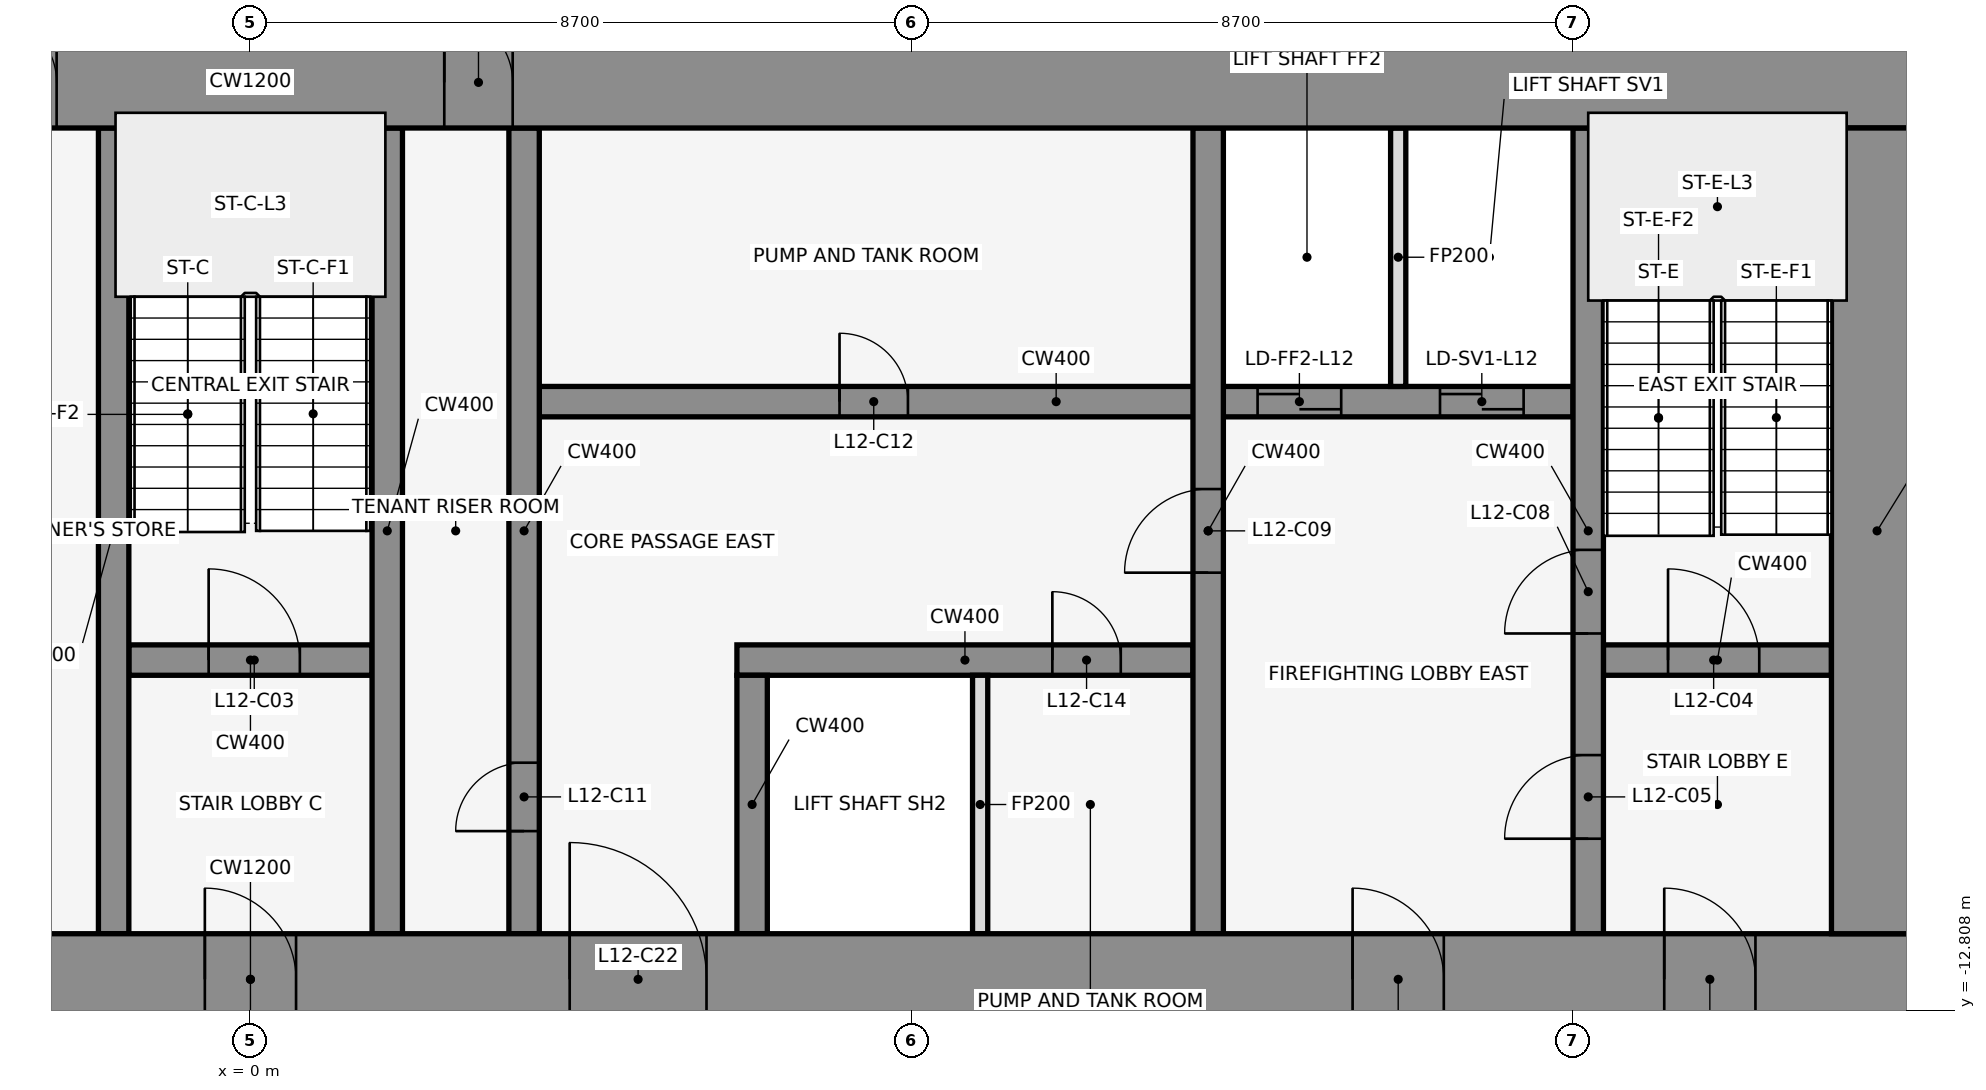
"""IFC4 building model, lengths in metres.
Left out: names, types, materials, properties, quantities, classifications, styles, units other than length and angle.
Written with IfcOpenShell. Run it as: python <this file> out.ifc"""

import sys

from ifc_helpers import new_model, si_unit, direction, frame, frame_2d, origin, place, context, subcontext, project, spatial, rectangle, extrude, element, fill, save


model = new_model("IFC4")
c1 = context("Model", 3, precision=1e-05, world=origin(), true_north=direction((0.0, 1.0)))
c2 = subcontext(c1, "Body", "Model", "MODEL_VIEW")
j1 = project(units=[si_unit("LENGTHUNIT", "METRE"), si_unit("PLANEANGLEUNIT", "RADIAN")], contexts=[c1])
p1 = place(None, origin())
s1 = spatial("IfcSite", under=j1, at=p1, CompositionType="ELEMENT")
p2 = place(p1, origin())
s2 = spatial("IfcBuilding", under=s1, at=p2, CompositionType="ELEMENT")
p3 = place(p2, frame((0.0, 0.0, 62.0)))
s3 = spatial("IfcBuildingStorey", under=s2, at=p3, CompositionType="ELEMENT", Elevation=62.0)
for number, where, z_axis, x_axis in (
    (1, (16.432, -0.105, 0.0), (0.0, 0.0, 1.0), (-0.84, 0.543, 0.0)),
    (2, (1.901, 1.08, 0.0), (0.0, 0.0, 1.0), (-0.84, -0.543, 0.0)),
    (3, (-0.068, -0.105, 0.0), (0.0, 0.0, 1.0), (-0.84, 0.543, 0.0)),
):
    element("IfcWall", number, at=place(p3, frame(where, z_axis=z_axis, x_axis=x_axis)), inside=s3, PredefinedType="STANDARD", context=c2, shape_type="SweptSolid", body=[
        extrude(rectangle(XDim=2.183, YDim=0.25, at=frame_2d((1.091, 0.0))), origin(), (0.0, 0.0, 1.0), 4.35),
    ])
p4 = place(p3, frame((-1.6, -8.2, 0.0), z_axis=(0.0, 0.0, 1.0), x_axis=(1.0, 0.0, 0.0)))
e4 = element("IfcWall", 4, at=p4, inside=s3, PredefinedType="SHEAR", context=c2, shape_type="SweptSolid", body=[
    extrude(rectangle(XDim=3.2, YDim=0.4, at=frame_2d((1.6, 0.0))), origin(), (0.0, 0.0, 1.0), 4.5),
])
p5 = place(p4, frame((1.05, 0.0, 0.0)))
e5 = element("IfcOpeningElement", 5, at=p5, cuts=e4, PredefinedType="OPENING", context=c2, shape_type="SweptSolid", body=[
    extrude(rectangle(XDim=1.2, YDim=2.1, at=frame_2d((0.6, 1.05))), frame((0.0, 0.212, 0.0), z_axis=(0.0, -1.0, 0.0), x_axis=(1.0, 0.0, 0.0)), (0.0, 0.0, 1.0), 0.424),
])
p6 = place(p3, frame((6.4, -8.2, 0.0), z_axis=(0.0, 0.0, 1.0), x_axis=(1.0, 0.0, 0.0)))
e6 = element("IfcWall", 6, at=p6, inside=s3, PredefinedType="SHEAR", context=c2, shape_type="SweptSolid", body=[
    extrude(rectangle(XDim=6.0, YDim=0.4, at=frame_2d((3.0, 0.0))), origin(), (0.0, 0.0, 1.0), 4.5),
])
p7 = place(p6, frame((4.15, 0.0, 0.0)))
e7 = element("IfcOpeningElement", 7, at=p7, cuts=e6, PredefinedType="OPENING", context=c2, shape_type="SweptSolid", body=[
    extrude(rectangle(XDim=0.9, YDim=2.1, at=frame_2d((0.45, 1.05))), frame((0.0, 0.212, 0.0), z_axis=(0.0, -1.0, 0.0), x_axis=(1.0, 0.0, 0.0)), (0.0, 0.0, 1.0), 0.424),
])
p8 = place(p3, frame((17.8, -8.2, 0.0), z_axis=(0.0, 0.0, 1.0), x_axis=(1.0, 0.0, 0.0)))
e8 = element("IfcWall", 8, at=p8, inside=s3, PredefinedType="SHEAR", context=c2, shape_type="SweptSolid", body=[
    extrude(rectangle(XDim=3.0, YDim=0.4, at=frame_2d((1.5, 0.0))), origin(), (0.0, 0.0, 1.0), 4.5),
])
p9 = place(p8, frame((0.85, 0.0, 0.0)))
e9 = element("IfcOpeningElement", 9, at=p9, cuts=e8, PredefinedType="OPENING", context=c2, shape_type="SweptSolid", body=[
    extrude(rectangle(XDim=1.2, YDim=2.1, at=frame_2d((0.6, 1.05))), frame((0.0, 0.212, 0.0), z_axis=(0.0, -1.0, 0.0), x_axis=(1.0, 0.0, 0.0)), (0.0, 0.0, 1.0), 0.424),
])
p10 = place(p3, frame((3.8, -4.8, 0.0), z_axis=(0.0, 0.0, 1.0), x_axis=(1.0, 0.0, 0.0)))
e10 = element("IfcWall", 10, at=p10, inside=s3, PredefinedType="SHEAR", context=c2, shape_type="SweptSolid", body=[
    extrude(rectangle(XDim=13.6, YDim=0.4, at=frame_2d((6.8, 0.0))), origin(), (0.0, 0.0, 1.0), 4.5),
])
p11 = place(p10, frame((9.45, 0.0, 0.0)))
e11 = element("IfcOpeningElement", 11, at=p11, cuts=e10, PredefinedType="OPENING", context=c2, shape_type="SweptSolid", body=[
    extrude(rectangle(XDim=1.1, YDim=2.1, at=frame_2d((0.55, 1.05))), frame((0.0, 0.212, 0.0), z_axis=(0.0, -1.0, 0.0), x_axis=(1.0, 0.0, 0.0)), (0.0, 0.0, 1.0), 0.424),
])
p12 = place(p10, frame((11.85, 0.0, 0.0)))
e12 = element("IfcOpeningElement", 12, at=p12, cuts=e10, PredefinedType="OPENING", context=c2, shape_type="SweptSolid", body=[
    extrude(rectangle(XDim=1.1, YDim=2.1, at=frame_2d((0.55, 1.05))), frame((0.0, 0.212, 0.0), z_axis=(0.0, -1.0, 0.0), x_axis=(1.0, 0.0, 0.0)), (0.0, 0.0, 1.0), 0.424),
])
p13 = place(p10, frame((3.95, 0.0, 0.0)))
e13 = element("IfcOpeningElement", 13, at=p13, cuts=e10, PredefinedType="OPENING", context=c2, shape_type="SweptSolid", body=[
    extrude(rectangle(XDim=0.9, YDim=2.1, at=frame_2d((0.45, 1.05))), frame((0.0, 0.212, 0.0), z_axis=(0.0, -1.0, 0.0), x_axis=(1.0, 0.0, 0.0)), (0.0, 0.0, 1.0), 0.424),
])
for number, where, z_axis, x_axis in (
    (14, (-1.8, -11.8, 0.0), (0.0, 0.0, 1.0), (0.0, 1.0, 0.0)),
    (15, (1.8, -11.8, 0.0), (0.0, 0.0, 1.0), (0.0, 1.0, 0.0)),
):
    element("IfcWall", number, at=place(p3, frame(where, z_axis=z_axis, x_axis=x_axis)), inside=s3, PredefinedType="SHEAR", context=c2, shape_type="SweptSolid", body=[
        extrude(rectangle(XDim=10.6, YDim=0.4, at=frame_2d((5.3, 0.0))), origin(), (0.0, 0.0, 1.0), 4.5),
    ])
p14 = place(p3, frame((3.6, -11.8, 0.0), z_axis=(0.0, 0.0, 1.0), x_axis=(0.0, 1.0, 0.0)))
e16 = element("IfcWall", 16, at=p14, inside=s3, PredefinedType="SHEAR", context=c2, shape_type="SweptSolid", body=[
    extrude(rectangle(XDim=10.6, YDim=0.4, at=frame_2d((5.3, 0.0))), origin(), (0.0, 0.0, 1.0), 4.5),
])
p15 = place(p14, frame((1.35, 0.0, 0.0)))
e17 = element("IfcOpeningElement", 17, at=p15, cuts=e16, PredefinedType="OPENING", context=c2, shape_type="SweptSolid", body=[
    extrude(rectangle(XDim=0.9, YDim=2.1, at=frame_2d((0.45, 1.05))), frame((0.0, 0.212, 0.0), z_axis=(0.0, -1.0, 0.0), x_axis=(1.0, 0.0, 0.0)), (0.0, 0.0, 1.0), 0.424),
])
p16 = place(p3, frame((6.6, -11.8, 0.0), z_axis=(0.0, 0.0, 1.0), x_axis=(0.0, 1.0, 0.0)))
e18 = element("IfcWall", 18, at=p16, inside=s3, PredefinedType="SHEAR", context=c2, shape_type="SweptSolid", body=[
    extrude(rectangle(XDim=3.4, YDim=0.4, at=frame_2d((1.7, 0.0))), origin(), (0.0, 0.0, 1.0), 4.5),
])
p17 = place(p3, frame((9.6, -11.8, 0.0), z_axis=(0.0, 0.0, 1.0), x_axis=(0.0, 1.0, 0.0)))
e19 = element("IfcWall", 19, at=p17, inside=s3, PredefinedType="PARTITIONING", context=c2, shape_type="SweptSolid", body=[
    extrude(rectangle(XDim=3.4, YDim=0.2, at=frame_2d((1.7, 0.0))), origin(), (0.0, 0.0, 1.0), 3.418),
])
p18 = place(p3, frame((12.6, -11.8, 0.0), z_axis=(0.0, 0.0, 1.0), x_axis=(0.0, 1.0, 0.0)))
e20 = element("IfcWall", 20, at=p18, inside=s3, PredefinedType="SHEAR", context=c2, shape_type="SweptSolid", body=[
    extrude(rectangle(XDim=10.6, YDim=0.4, at=frame_2d((5.3, 0.0))), origin(), (0.0, 0.0, 1.0), 4.5),
])
p19 = place(p18, frame((4.75, 0.0, 0.0)))
e21 = element("IfcOpeningElement", 21, at=p19, cuts=e20, PredefinedType="OPENING", context=c2, shape_type="SweptSolid", body=[
    extrude(rectangle(XDim=1.1, YDim=2.1, at=frame_2d((0.55, 1.05))), frame((0.0, 0.212, 0.0), z_axis=(0.0, -1.0, 0.0), x_axis=(1.0, 0.0, 0.0)), (0.0, 0.0, 1.0), 0.424),
])
p20 = place(p3, frame((15.1, -4.6, 0.0), z_axis=(0.0, 0.0, 1.0), x_axis=(0.0, 1.0, 0.0)))
e22 = element("IfcWall", 22, at=p20, inside=s3, PredefinedType="PARTITIONING", context=c2, shape_type="SweptSolid", body=[
    extrude(rectangle(XDim=3.4, YDim=0.2, at=frame_2d((1.7, 0.0))), origin(), (0.0, 0.0, 1.0), 3.418),
])
p21 = place(p3, frame((17.6, -11.8, 0.0), z_axis=(0.0, 0.0, 1.0), x_axis=(0.0, 1.0, 0.0)))
e23 = element("IfcWall", 23, at=p21, inside=s3, PredefinedType="SHEAR", context=c2, shape_type="SweptSolid", body=[
    extrude(rectangle(XDim=10.6, YDim=0.4, at=frame_2d((5.3, 0.0))), origin(), (0.0, 0.0, 1.0), 4.5),
])
p22 = place(p21, frame((1.25, 0.0, 0.0)))
e24 = element("IfcOpeningElement", 24, at=p22, cuts=e23, PredefinedType="OPENING", context=c2, shape_type="SweptSolid", body=[
    extrude(rectangle(XDim=1.1, YDim=2.1, at=frame_2d((0.55, 1.05))), frame((0.0, 0.212, 0.0), z_axis=(0.0, -1.0, 0.0), x_axis=(1.0, 0.0, 0.0)), (0.0, 0.0, 1.0), 0.424),
])
p23 = place(p21, frame((3.95, 0.0, 0.0)))
e25 = element("IfcOpeningElement", 25, at=p23, cuts=e23, PredefinedType="OPENING", context=c2, shape_type="SweptSolid", body=[
    extrude(rectangle(XDim=1.1, YDim=2.1, at=frame_2d((0.55, 1.05))), frame((0.0, 0.212, 0.0), z_axis=(0.0, -1.0, 0.0), x_axis=(1.0, 0.0, 0.0)), (0.0, 0.0, 1.0), 0.424),
])
p24 = place(p3, frame((-22.0, -0.6, 0.0), z_axis=(0.0, 0.0, 1.0), x_axis=(1.0, 0.0, 0.0)))
e26 = element("IfcWall", 26, at=p24, inside=s3, PredefinedType="SHEAR", context=c2, shape_type="SweptSolid", body=[
    extrude(rectangle(XDim=44.0, YDim=1.2, at=frame_2d((22.0, 0.0))), origin(), (0.0, 0.0, 1.0), 4.5),
])
p25 = place(p24, frame((18.55, 0.0, 0.0)))
e27 = element("IfcOpeningElement", 27, at=p25, cuts=e26, PredefinedType="OPENING", context=c2, shape_type="SweptSolid", body=[
    extrude(rectangle(XDim=0.9, YDim=2.1, at=frame_2d((0.45, 1.05))), frame((0.0, 0.612, 0.0), z_axis=(0.0, -1.0, 0.0), x_axis=(1.0, 0.0, 0.0)), (0.0, 0.0, 1.0), 1.224),
])
p26 = place(p24, frame((24.55, 0.0, 0.0)))
e28 = element("IfcOpeningElement", 28, at=p26, cuts=e26, PredefinedType="OPENING", context=c2, shape_type="SweptSolid", body=[
    extrude(rectangle(XDim=0.9, YDim=2.1, at=frame_2d((0.45, 1.05))), frame((0.0, 0.612, 0.0), z_axis=(0.0, -1.0, 0.0), x_axis=(1.0, 0.0, 0.0)), (0.0, 0.0, 1.0), 1.224),
])
p27 = place(p3, frame((-22.0, -12.4, 0.0), z_axis=(0.0, 0.0, 1.0), x_axis=(1.0, 0.0, 0.0)))
e29 = element("IfcWall", 29, at=p27, inside=s3, PredefinedType="SHEAR", context=c2, shape_type="SweptSolid", body=[
    extrude(rectangle(XDim=44.0, YDim=1.2, at=frame_2d((22.0, 0.0))), origin(), (0.0, 0.0, 1.0), 4.5),
])
p28 = place(p27, frame((2.2, 0.0, 0.0)))
e30 = element("IfcOpeningElement", 30, at=p28, cuts=e29, PredefinedType="OPENING", context=c2, shape_type="SweptSolid", body=[
    extrude(rectangle(XDim=1.2, YDim=2.1, at=frame_2d((0.6, 1.05))), frame((0.0, 0.612, 0.0), z_axis=(0.0, -1.0, 0.0), x_axis=(1.0, 0.0, 0.0)), (0.0, 0.0, 1.0), 1.224),
])
p29 = place(p27, frame((21.4, 0.0, 0.0)))
e31 = element("IfcOpeningElement", 31, at=p29, cuts=e29, PredefinedType="OPENING", context=c2, shape_type="SweptSolid", body=[
    extrude(rectangle(XDim=1.2, YDim=2.1, at=frame_2d((0.6, 1.05))), frame((0.0, 0.612, 0.0), z_axis=(0.0, -1.0, 0.0), x_axis=(1.0, 0.0, 0.0)), (0.0, 0.0, 1.0), 1.224),
])
p30 = place(p27, frame((40.6, 0.0, 0.0)))
e32 = element("IfcOpeningElement", 32, at=p30, cuts=e29, PredefinedType="OPENING", context=c2, shape_type="SweptSolid", body=[
    extrude(rectangle(XDim=1.2, YDim=2.1, at=frame_2d((0.6, 1.05))), frame((0.0, 0.612, 0.0), z_axis=(0.0, -1.0, 0.0), x_axis=(1.0, 0.0, 0.0)), (0.0, 0.0, 1.0), 1.224),
])
p31 = place(p27, frame((16.0, 0.0, 0.0)))
e33 = element("IfcOpeningElement", 33, at=p31, cuts=e29, PredefinedType="OPENING", context=c2, shape_type="SweptSolid", body=[
    extrude(rectangle(XDim=1.8, YDim=2.1, at=frame_2d((0.9, 1.05))), frame((0.0, 0.612, 0.0), z_axis=(0.0, -1.0, 0.0), x_axis=(1.0, 0.0, 0.0)), (0.0, 0.0, 1.0), 1.224),
])
p32 = place(p27, frame((6.3, 0.0, 0.0)))
e34 = element("IfcOpeningElement", 34, at=p32, cuts=e29, PredefinedType="OPENING", context=c2, shape_type="SweptSolid", body=[
    extrude(rectangle(XDim=1.2, YDim=2.1, at=frame_2d((0.6, 1.05))), frame((0.0, 0.612, 0.0), z_axis=(0.0, -1.0, 0.0), x_axis=(1.0, 0.0, 0.0)), (0.0, 0.0, 1.0), 1.224),
])
p33 = place(p27, frame((26.2, 0.0, 0.0)))
e35 = element("IfcOpeningElement", 35, at=p33, cuts=e29, PredefinedType="OPENING", context=c2, shape_type="SweptSolid", body=[
    extrude(rectangle(XDim=1.8, YDim=2.1, at=frame_2d((0.9, 1.05))), frame((0.0, 0.612, 0.0), z_axis=(0.0, -1.0, 0.0), x_axis=(1.0, 0.0, 0.0)), (0.0, 0.0, 1.0), 1.224),
])
p34 = place(p27, frame((36.5, 0.0, 0.0)))
e36 = element("IfcOpeningElement", 36, at=p34, cuts=e29, PredefinedType="OPENING", context=c2, shape_type="SweptSolid", body=[
    extrude(rectangle(XDim=1.2, YDim=2.1, at=frame_2d((0.6, 1.05))), frame((0.0, 0.612, 0.0), z_axis=(0.0, -1.0, 0.0), x_axis=(1.0, 0.0, 0.0)), (0.0, 0.0, 1.0), 1.224),
])
p35 = place(p3, frame((21.4, -11.8, 0.0), z_axis=(0.0, 0.0, 1.0), x_axis=(0.0, 1.0, 0.0)))
e37 = element("IfcWall", 37, at=p35, inside=s3, PredefinedType="SHEAR", context=c2, shape_type="SweptSolid", body=[
    extrude(rectangle(XDim=10.6, YDim=1.2, at=frame_2d((5.3, 0.0))), origin(), (0.0, 0.0, 1.0), 4.5),
])
p36 = place(p5, origin())
e38 = element("IfcDoor", 38, at=p36, inside=s3, OperationType="SINGLE_SWING_LEFT", PredefinedType="DOOR", context=c2, shape_type="SweptSolid", body=[
    extrude(rectangle(XDim=1.2, YDim=2.1, at=frame_2d((0.6, 1.05))), frame((0.0, 0.025, 0.0), z_axis=(0.0, -1.0, 0.0), x_axis=(1.0, 0.0, 0.0)), (0.0, 0.0, 1.0), 0.05),
])
fill(e5, e38)
p37 = place(p9, origin())
e39 = element("IfcDoor", 39, at=p37, inside=s3, OperationType="SINGLE_SWING_RIGHT", PredefinedType="DOOR", context=c2, shape_type="SweptSolid", body=[
    extrude(rectangle(XDim=1.2, YDim=2.1, at=frame_2d((0.6, 1.05))), frame((0.0, 0.025, 0.0), z_axis=(0.0, -1.0, 0.0), x_axis=(1.0, 0.0, 0.0)), (0.0, 0.0, 1.0), 0.05),
])
fill(e9, e39)
p38 = place(p22, origin())
e40 = element("IfcDoor", 40, at=p38, inside=s3, OperationType="SINGLE_SWING_LEFT", PredefinedType="DOOR", context=c2, shape_type="SweptSolid", body=[
    extrude(rectangle(XDim=1.1, YDim=2.1, at=frame_2d((0.55, 1.05))), frame((0.0, 0.025, 0.0), z_axis=(0.0, -1.0, 0.0), x_axis=(1.0, 0.0, 0.0)), (0.0, 0.0, 1.0), 0.05),
])
fill(e24, e40)
p39 = place(p11, origin())
e41 = element("IfcDoor", 41, at=p39, inside=s3, OperationType="DOUBLE_DOOR_SLIDING", PredefinedType="DOOR", context=c2, shape_type="SweptSolid", body=[
    extrude(rectangle(XDim=1.1, YDim=2.1, at=frame_2d((0.55, 1.05))), frame((0.0, 0.025, 0.0), z_axis=(0.0, -1.0, 0.0), x_axis=(1.0, 0.0, 0.0)), (0.0, 0.0, 1.0), 0.05),
])
fill(e11, e41)
p40 = place(p12, origin())
e42 = element("IfcDoor", 42, at=p40, inside=s3, OperationType="DOUBLE_DOOR_SLIDING", PredefinedType="DOOR", context=c2, shape_type="SweptSolid", body=[
    extrude(rectangle(XDim=1.1, YDim=2.1, at=frame_2d((0.55, 1.05))), frame((0.0, 0.025, 0.0), z_axis=(0.0, -1.0, 0.0), x_axis=(1.0, 0.0, 0.0)), (0.0, 0.0, 1.0), 0.05),
])
fill(e12, e42)
p41 = place(p23, origin())
e43 = element("IfcDoor", 43, at=p41, inside=s3, OperationType="SINGLE_SWING_RIGHT", PredefinedType="DOOR", context=c2, shape_type="SweptSolid", body=[
    extrude(rectangle(XDim=1.1, YDim=2.1, at=frame_2d((0.55, 1.05))), frame((0.0, 0.025, 0.0), z_axis=(0.0, -1.0, 0.0), x_axis=(1.0, 0.0, 0.0)), (0.0, 0.0, 1.0), 0.05),
])
fill(e25, e43)
p42 = place(p19, frame((1.1, 0.0, 0.0), z_axis=(0.0, 0.0, 1.0), x_axis=(-1.0, 0.0, 0.0)))
e44 = element("IfcDoor", 44, at=p42, inside=s3, OperationType="SINGLE_SWING_RIGHT", PredefinedType="DOOR", context=c2, shape_type="SweptSolid", body=[
    extrude(rectangle(XDim=1.1, YDim=2.1, at=frame_2d((0.55, 1.05))), frame((0.0, 0.025, 0.0), z_axis=(0.0, -1.0, 0.0), x_axis=(1.0, 0.0, 0.0)), (0.0, 0.0, 1.0), 0.05),
])
fill(e21, e44)
p43 = place(p15, origin())
e45 = element("IfcDoor", 45, at=p43, inside=s3, OperationType="SINGLE_SWING_LEFT", PredefinedType="DOOR", context=c2, shape_type="SweptSolid", body=[
    extrude(rectangle(XDim=0.9, YDim=2.1, at=frame_2d((0.45, 1.05))), frame((0.0, 0.025, 0.0), z_axis=(0.0, -1.0, 0.0), x_axis=(1.0, 0.0, 0.0)), (0.0, 0.0, 1.0), 0.05),
])
fill(e17, e45)
p44 = place(p13, origin())
e46 = element("IfcDoor", 46, at=p44, inside=s3, OperationType="SINGLE_SWING_RIGHT", PredefinedType="DOOR", context=c2, shape_type="SweptSolid", body=[
    extrude(rectangle(XDim=0.9, YDim=2.1, at=frame_2d((0.45, 1.05))), frame((0.0, 0.025, 0.0), z_axis=(0.0, -1.0, 0.0), x_axis=(1.0, 0.0, 0.0)), (0.0, 0.0, 1.0), 0.05),
])
fill(e13, e46)
p45 = place(p7, frame((0.9, 0.0, 0.0), z_axis=(0.0, 0.0, 1.0), x_axis=(-1.0, 0.0, 0.0)))
e47 = element("IfcDoor", 47, at=p45, inside=s3, OperationType="SINGLE_SWING_LEFT", PredefinedType="DOOR", context=c2, shape_type="SweptSolid", body=[
    extrude(rectangle(XDim=0.9, YDim=2.1, at=frame_2d((0.45, 1.05))), frame((0.0, 0.025, 0.0), z_axis=(0.0, -1.0, 0.0), x_axis=(1.0, 0.0, 0.0)), (0.0, 0.0, 1.0), 0.05),
])
fill(e7, e47)
p46 = place(p25, origin())
e48 = element("IfcDoor", 48, at=p46, inside=s3, OperationType="SINGLE_SWING_LEFT", PredefinedType="DOOR", context=c2, shape_type="SweptSolid", body=[
    extrude(rectangle(XDim=0.9, YDim=2.1, at=frame_2d((0.45, 1.05))), frame((0.0, 0.025, 0.0), z_axis=(0.0, -1.0, 0.0), x_axis=(1.0, 0.0, 0.0)), (0.0, 0.0, 1.0), 0.05),
])
fill(e27, e48)
p47 = place(p26, origin())
e49 = element("IfcDoor", 49, at=p47, inside=s3, OperationType="SINGLE_SWING_LEFT", PredefinedType="DOOR", context=c2, shape_type="SweptSolid", body=[
    extrude(rectangle(XDim=0.9, YDim=2.1, at=frame_2d((0.45, 1.05))), frame((0.0, 0.025, 0.0), z_axis=(0.0, -1.0, 0.0), x_axis=(1.0, 0.0, 0.0)), (0.0, 0.0, 1.0), 0.05),
])
fill(e28, e49)
p48 = place(p29, frame((1.2, 0.0, 0.0), z_axis=(0.0, 0.0, 1.0), x_axis=(-1.0, 0.0, 0.0)))
e50 = element("IfcDoor", 50, at=p48, inside=s3, OperationType="SINGLE_SWING_RIGHT", PredefinedType="DOOR", context=c2, shape_type="SweptSolid", body=[
    extrude(rectangle(XDim=1.2, YDim=2.1, at=frame_2d((0.6, 1.05))), frame((0.0, 0.025, 0.0), z_axis=(0.0, -1.0, 0.0), x_axis=(1.0, 0.0, 0.0)), (0.0, 0.0, 1.0), 0.05),
])
fill(e31, e50)
p49 = place(p30, frame((1.2, 0.0, 0.0), z_axis=(0.0, 0.0, 1.0), x_axis=(-1.0, 0.0, 0.0)))
e51 = element("IfcDoor", 51, at=p49, inside=s3, OperationType="SINGLE_SWING_RIGHT", PredefinedType="DOOR", context=c2, shape_type="SweptSolid", body=[
    extrude(rectangle(XDim=1.2, YDim=2.1, at=frame_2d((0.6, 1.05))), frame((0.0, 0.025, 0.0), z_axis=(0.0, -1.0, 0.0), x_axis=(1.0, 0.0, 0.0)), (0.0, 0.0, 1.0), 0.05),
])
fill(e32, e51)
p50 = place(p33, origin())
e52 = element("IfcDoor", 52, at=p50, inside=s3, OperationType="SINGLE_SWING_LEFT", PredefinedType="DOOR", context=c2, shape_type="SweptSolid", body=[
    extrude(rectangle(XDim=1.8, YDim=2.1, at=frame_2d((0.9, 1.05))), frame((0.0, 0.025, 0.0), z_axis=(0.0, -1.0, 0.0), x_axis=(1.0, 0.0, 0.0)), (0.0, 0.0, 1.0), 0.05),
])
fill(e35, e52)
p51 = place(p34, frame((1.2, 0.0, 0.0), z_axis=(0.0, 0.0, 1.0), x_axis=(-1.0, 0.0, 0.0)))
e53 = element("IfcDoor", 53, at=p51, inside=s3, OperationType="SINGLE_SWING_RIGHT", PredefinedType="DOOR", context=c2, shape_type="SweptSolid", body=[
    extrude(rectangle(XDim=1.2, YDim=2.1, at=frame_2d((0.6, 1.05))), frame((0.0, 0.025, 0.0), z_axis=(0.0, -1.0, 0.0), x_axis=(1.0, 0.0, 0.0)), (0.0, 0.0, 1.0), 0.05),
])
fill(e36, e53)
save(model, sys.argv[1])
